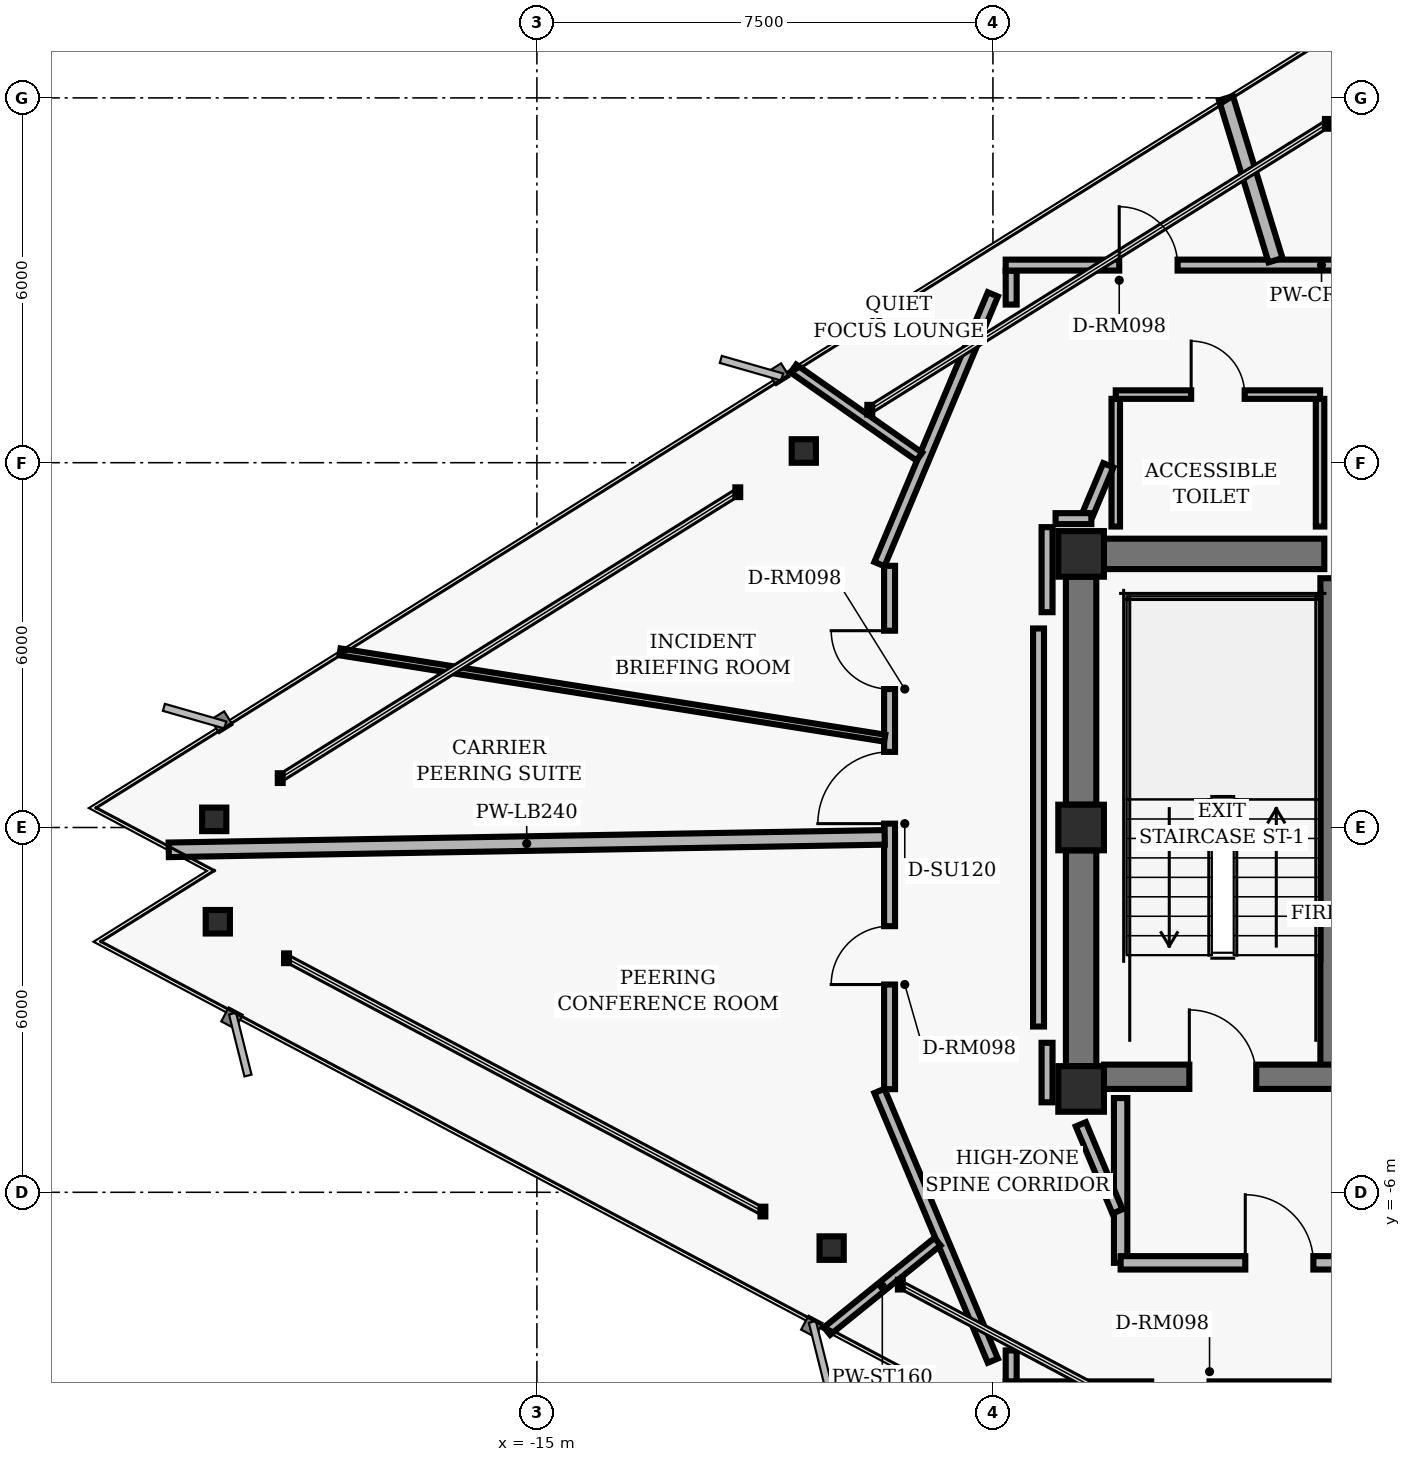
"""IFC4 building model, lengths in metres.
Left out: names, types, materials, properties, quantities, classifications, styles, units other than length and angle.
Written with IfcOpenShell. Run it as: python <this file> out.ifc"""

import sys

from ifc_helpers import new_model, si_unit, direction, frame, frame_2d, origin, origin_2d, place, context, subcontext, project, spatial, rectangle, hollow_rectangle, i_section, extrude, element, fill, save


model = new_model("IFC4")
c1 = context("Model", 3, precision=1e-05, world=origin(), true_north=direction((0.0, 1.0)))
c2 = subcontext(c1, "Body", "Model", "MODEL_VIEW")
j1 = project(units=[si_unit("LENGTHUNIT", "METRE"), si_unit("PLANEANGLEUNIT", "RADIAN")], contexts=[c1])
p1 = place(None, origin())
s1 = spatial("IfcSite", under=j1, at=p1, CompositionType="ELEMENT")
p2 = place(p1, origin())
s2 = spatial("IfcBuilding", under=s1, at=p2, CompositionType="ELEMENT")
p3 = place(p2, frame((0.0, 0.0, 196.64)))
s3 = spatial("IfcBuildingStorey", under=s2, at=p3, CompositionType="ELEMENT", Elevation=196.64)
for number, where, z_axis, x_axis in (
    (1, (-6.05, 4.5, 0.0), (0.0, 0.0, 1.0), (1.0, 0.0, 0.0)),
    (2, (-6.05, 0.0, 0.0), (0.0, 0.0, 1.0), (1.0, 0.0, 0.0)),
    (3, (-6.05, -4.3, 0.0), (0.0, 0.0, 1.0), (1.0, 0.0, 0.0)),
):
    element("IfcColumn", number, at=place(p3, frame(where, z_axis=z_axis, x_axis=x_axis)), inside=s3, PredefinedType="COLUMN", context=c2, shape_type="SweptSolid", body=[
        extrude(hollow_rectangle(XDim=0.75, YDim=0.75, WallThickness=0.05, InnerFilletRadius=0.02, OuterFilletRadius=0.04, at=origin_2d()), origin(), (0.0, 0.0, 1.0), 3.04),
    ])
p4 = place(p3, frame((-6.05, 0.375, 0.0), z_axis=(0.0, 0.0, 1.0), x_axis=(0.0, 1.0, 0.0)))
e4 = element("IfcWall", 4, at=p4, inside=s3, PredefinedType="SHEAR", context=c2, shape_type="SweptSolid", body=[
    extrude(rectangle(XDim=3.75, YDim=0.5, at=frame_2d((1.875, 0.0))), origin(), (0.0, 0.0, 1.0), 2.798),
])
p5 = place(p3, frame((-6.05, -3.925, 0.0), z_axis=(0.0, 0.0, 1.0), x_axis=(0.0, 1.0, 0.0)))
e5 = element("IfcWall", 5, at=p5, inside=s3, PredefinedType="SHEAR", context=c2, shape_type="SweptSolid", body=[
    extrude(rectangle(XDim=3.55, YDim=0.5, at=frame_2d((1.775, 0.0))), origin(), (0.0, 0.0, 1.0), 2.798),
])
p6 = place(p3, frame((-1.94, -4.1, 0.0), z_axis=(0.0, 0.0, 1.0), x_axis=(0.0, 1.0, 0.0)))
e6 = element("IfcWall", 6, at=p6, inside=s3, PredefinedType="SHEAR", context=c2, shape_type="SweptSolid", body=[
    extrude(rectangle(XDim=8.2, YDim=0.35, at=frame_2d((4.1, 0.0))), origin(), (0.0, 0.0, 1.0), 2.798),
])
p7 = place(p3, frame((-5.675, -4.1, 0.0), z_axis=(0.0, 0.0, 1.0), x_axis=(1.0, 0.0, 0.0)))
e7 = element("IfcWall", 7, at=p7, inside=s3, PredefinedType="SHEAR", context=c2, shape_type="SweptSolid", body=[
    extrude(rectangle(XDim=11.35, YDim=0.4, at=frame_2d((5.675, 0.0))), origin(), (0.0, 0.0, 1.0), 2.798),
])
p8 = place(p7, frame((1.405, 0.0, 0.0)))
e8 = element("IfcOpeningElement", 8, at=p8, cuts=e7, PredefinedType="OPENING", context=c2, shape_type="SweptSolid", body=[
    extrude(rectangle(XDim=1.1, YDim=2.04, at=frame_2d((0.55, 1.02))), frame((0.0, 0.21, 0.0), z_axis=(0.0, -1.0, 0.0), x_axis=(1.0, 0.0, 0.0)), (0.0, 0.0, 1.0), 0.42),
])
p9 = place(p7, frame((8.845, 0.0, 0.0)))
e9 = element("IfcOpeningElement", 9, at=p9, cuts=e7, PredefinedType="OPENING", context=c2, shape_type="SweptSolid", body=[
    extrude(rectangle(XDim=1.1, YDim=2.04, at=frame_2d((0.55, 1.02))), frame((0.0, 0.21, 0.0), z_axis=(0.0, -1.0, 0.0), x_axis=(1.0, 0.0, 0.0)), (0.0, 0.0, 1.0), 0.42),
])
p10 = place(p7, frame((4.145, 0.0, 0.0)))
e10 = element("IfcOpeningElement", 10, at=p10, cuts=e7, PredefinedType="OPENING", context=c2, shape_type="SweptSolid", body=[
    extrude(rectangle(XDim=1.06, YDim=2.04, at=frame_2d((0.53, 1.02))), frame((0.0, 0.21, 0.0), z_axis=(0.0, -1.0, 0.0), x_axis=(1.0, 0.0, 0.0)), (0.0, 0.0, 1.0), 0.42),
])
p11 = place(p7, frame((6.145, 0.0, 0.0)))
e11 = element("IfcOpeningElement", 11, at=p11, cuts=e7, PredefinedType="OPENING", context=c2, shape_type="SweptSolid", body=[
    extrude(rectangle(XDim=1.06, YDim=2.04, at=frame_2d((0.53, 1.02))), frame((0.0, 0.21, 0.0), z_axis=(0.0, -1.0, 0.0), x_axis=(1.0, 0.0, 0.0)), (0.0, 0.0, 1.0), 0.42),
])
p12 = place(p3, frame((-5.675, 4.5, 0.0), z_axis=(0.0, 0.0, 1.0), x_axis=(1.0, 0.0, 0.0)))
e12 = element("IfcWall", 12, at=p12, inside=s3, PredefinedType="SHEAR", context=c2, shape_type="SweptSolid", body=[
    extrude(rectangle(XDim=3.625, YDim=0.5, at=frame_2d((1.812, 0.0))), origin(), (0.0, 0.0, 1.0), 2.798),
])
for number, where, z_axis, x_axis in (
    (13, (-10.611, 6.193, 0.0), (0.0, 0.0, 1.0), (1.0, 0.0, 0.0)),
    (14, (-20.307, 0.134, 0.0), (0.0, 0.0, 1.0), (1.0, 0.0, 0.0)),
    (15, (-20.248, -1.55, 0.0), (0.0, 0.0, 1.0), (1.0, 0.0, 0.0)),
    (16, (-10.153, -6.918, 0.0), (0.0, 0.0, 1.0), (1.0, 0.0, 0.0)),
):
    element("IfcColumn", number, at=place(p3, frame(where, z_axis=z_axis, x_axis=x_axis)), inside=s3, PredefinedType="COLUMN", context=c2, shape_type="SweptSolid", body=[
        extrude(i_section(OverallWidth=0.398, OverallDepth=0.387, WebThickness=0.021, FlangeThickness=0.033, FilletRadius=0.018, at=origin_2d()), origin(), (0.0, 0.0, 1.0), 3.04),
    ])
p13 = place(p3, frame((-5.4, -7.16, 0.0), z_axis=(0.0, 0.0, 1.0), x_axis=(0.0, 1.0, 0.0)))
e17 = element("IfcWall", 17, at=p13, inside=s3, PredefinedType="PARTITIONING", context=c2, shape_type="SweptSolid", body=[
    extrude(rectangle(XDim=2.71, YDim=0.22, at=frame_2d((1.355, 0.0))), origin(), (0.0, 0.0, 1.0), 2.773),
])
p14 = place(p3, frame((-5.4, -7.16, 0.0), z_axis=(0.0, 0.0, 1.0), x_axis=(1.0, 0.0, 0.0)))
e18 = element("IfcWall", 18, at=p14, inside=s3, PredefinedType="PARTITIONING", context=c2, shape_type="SweptSolid", body=[
    extrude(rectangle(XDim=5.4, YDim=0.22, at=frame_2d((2.7, 0.0))), origin(), (0.0, 0.0, 1.0), 2.395),
])
p15 = place(p14, frame((2.05, 0.0, 0.0)))
e19 = element("IfcOpeningElement", 19, at=p15, cuts=e18, PredefinedType="OPENING", context=c2, shape_type="SweptSolid", body=[
    extrude(rectangle(XDim=1.12, YDim=2.02, at=frame_2d((0.56, 1.01))), frame((0.0, 0.12, 0.0), z_axis=(0.0, -1.0, 0.0), x_axis=(1.0, 0.0, 0.0)), (0.0, 0.0, 1.0), 0.24),
])
for number, where, z_axis, x_axis in (
    (20, (-5.48, 4.95, 0.0), (0.0, 0.0, 1.0), (0.0, 1.0, 0.0)),
    (21, (-2.12, 4.95, 0.0), (0.0, 0.0, 1.0), (0.0, 1.0, 0.0)),
):
    element("IfcWall", number, at=place(p3, frame(where, z_axis=z_axis, x_axis=x_axis)), inside=s3, PredefinedType="PARTITIONING", context=c2, shape_type="SweptSolid", body=[
        extrude(rectangle(XDim=2.1, YDim=0.14, at=frame_2d((1.05, 0.0))), origin(), (0.0, 0.0, 1.0), 2.773),
    ])
p16 = place(p3, frame((-5.48, 7.12, 0.0), z_axis=(0.0, 0.0, 1.0), x_axis=(1.0, 0.0, 0.0)))
e22 = element("IfcWall", 22, at=p16, inside=s3, PredefinedType="PARTITIONING", context=c2, shape_type="SweptSolid", body=[
    extrude(rectangle(XDim=3.36, YDim=0.14, at=frame_2d((1.68, 0.0))), origin(), (0.0, 0.0, 1.0), 2.773),
])
p17 = place(p16, frame((1.24, 0.0, 0.0)))
e23 = element("IfcOpeningElement", 23, at=p17, cuts=e22, PredefinedType="OPENING", context=c2, shape_type="SweptSolid", body=[
    extrude(rectangle(XDim=0.88, YDim=2.02, at=frame_2d((0.44, 1.01))), frame((0.0, 0.08, 0.0), z_axis=(0.0, -1.0, 0.0), x_axis=(1.0, 0.0, 0.0)), (0.0, 0.0, 1.0), 0.16),
])
p18 = place(p3, frame((-7.501, -8.769, 0.0), z_axis=(0.0, 0.0, 1.0), x_axis=(-0.387573945081, 0.921838617706, 0.0)))
e24 = element("IfcWall", 24, at=p18, inside=s3, PredefinedType="PARTITIONING", context=c2, shape_type="SweptSolid", body=[
    extrude(rectangle(XDim=4.813, YDim=0.18, at=frame_2d((2.407, 0.0))), origin(), (0.0, 0.0, 1.0), 2.773),
])
p19 = place(p3, frame((-9.2, -4.303, 0.0), z_axis=(0.0, 0.0, 1.0), x_axis=(0.0, 1.0, 0.0)))
e25 = element("IfcWall", 25, at=p19, inside=s3, PredefinedType="PARTITIONING", context=c2, shape_type="SweptSolid", body=[
    extrude(rectangle(XDim=8.607, YDim=0.18, at=frame_2d((4.303, 0.0))), origin(), (0.0, 0.0, 1.0), 2.773),
])
p20 = place(p19, frame((1.721, 0.0, 0.0)))
e26 = element("IfcOpeningElement", 26, at=p20, cuts=e25, PredefinedType="OPENING", context=c2, shape_type="SweptSolid", body=[
    extrude(rectangle(XDim=0.96, YDim=2.02, at=frame_2d((0.48, 1.01))), frame((0.0, 0.1, 0.0), z_axis=(0.0, -1.0, 0.0), x_axis=(1.0, 0.0, 0.0)), (0.0, 0.0, 1.0), 0.2),
])
p21 = place(p19, frame((6.58, 0.0, 0.0)))
e27 = element("IfcOpeningElement", 27, at=p21, cuts=e25, PredefinedType="OPENING", context=c2, shape_type="SweptSolid", body=[
    extrude(rectangle(XDim=0.96, YDim=2.02, at=frame_2d((0.48, 1.01))), frame((0.0, 0.1, 0.0), z_axis=(0.0, -1.0, 0.0), x_axis=(1.0, 0.0, 0.0)), (0.0, 0.0, 1.0), 0.2),
])
p22 = place(p19, frame((4.367, 0.0, 0.0)))
e28 = element("IfcOpeningElement", 28, at=p22, cuts=e25, PredefinedType="OPENING", context=c2, shape_type="SweptSolid", body=[
    extrude(rectangle(XDim=1.18, YDim=2.02, at=frame_2d((0.59, 1.01))), frame((0.0, 0.1, 0.0), z_axis=(0.0, -1.0, 0.0), x_axis=(1.0, 0.0, 0.0)), (0.0, 0.0, 1.0), 0.2),
])
p23 = place(p3, frame((-9.367, 4.332, 0.0), z_axis=(0.0, 0.0, 1.0), x_axis=(0.387573945081, 0.921838617706, 0.0)))
e29 = element("IfcWall", 29, at=p23, inside=s3, PredefinedType="PARTITIONING", context=c2, shape_type="SweptSolid", body=[
    extrude(rectangle(XDim=4.813, YDim=0.18, at=frame_2d((2.407, 0.0))), origin(), (0.0, 0.0, 1.0), 2.773),
])
p24 = place(p3, frame((-7.2, 8.601, 0.0), z_axis=(0.0, 0.0, 1.0), x_axis=(0.0, 1.0, 0.0)))
e30 = element("IfcWall", 30, at=p24, inside=s3, PredefinedType="PARTITIONING", context=c2, shape_type="SweptSolid", body=[
    extrude(rectangle(XDim=0.559, YDim=0.18, at=frame_2d((0.28, 0.0))), origin(), (0.0, 0.0, 1.0), 2.773),
])
p25 = place(p3, frame((-7.29, 9.25, 0.0), z_axis=(0.0, 0.0, 1.0), x_axis=(1.0, 0.0, 0.0)))
e31 = element("IfcWall", 31, at=p25, inside=s3, PredefinedType="PARTITIONING", context=c2, shape_type="SweptSolid", body=[
    extrude(rectangle(XDim=13.3, YDim=0.18, at=frame_2d((6.65, 0.0))), origin(), (0.0, 0.0, 1.0), 2.773),
])
p26 = place(p25, frame((11.864, 0.0, 0.0)))
e32 = element("IfcOpeningElement", 32, at=p26, cuts=e31, PredefinedType="OPENING", context=c2, shape_type="SweptSolid", body=[
    extrude(rectangle(XDim=0.96, YDim=2.02, at=frame_2d((0.48, 1.01))), frame((0.0, 0.1, 0.0), z_axis=(0.0, -1.0, 0.0), x_axis=(1.0, 0.0, 0.0)), (0.0, 0.0, 1.0), 0.2),
])
p27 = place(p25, frame((7.561, 0.0, 0.0)))
e33 = element("IfcOpeningElement", 33, at=p27, cuts=e31, PredefinedType="OPENING", context=c2, shape_type="SweptSolid", body=[
    extrude(rectangle(XDim=0.96, YDim=2.02, at=frame_2d((0.48, 1.01))), frame((0.0, 0.1, 0.0), z_axis=(0.0, -1.0, 0.0), x_axis=(1.0, 0.0, 0.0)), (0.0, 0.0, 1.0), 0.2),
])
p28 = place(p25, frame((1.867, 0.0, 0.0)))
e34 = element("IfcOpeningElement", 34, at=p28, cuts=e31, PredefinedType="OPENING", context=c2, shape_type="SweptSolid", body=[
    extrude(rectangle(XDim=0.96, YDim=2.02, at=frame_2d((0.48, 1.01))), frame((0.0, 0.1, 0.0), z_axis=(0.0, -1.0, 0.0), x_axis=(1.0, 0.0, 0.0)), (0.0, 0.0, 1.0), 0.2),
])
p29 = place(p3, frame((-5.602, 5.958, 0.0), z_axis=(0.0, 0.0, 1.0), x_axis=(-0.387588639363, -0.921832439566, 0.0)))
e35 = element("IfcWall", 35, at=p29, inside=s3, PredefinedType="PARTITIONING", context=c2, shape_type="SweptSolid", body=[
    extrude(rectangle(XDim=0.862, YDim=0.18, at=frame_2d((0.431, 0.0))), origin(), (0.0, 0.0, 1.0), 2.773),
])
p30 = place(p3, frame((-5.881, 5.08, 0.0), z_axis=(0.0, 0.0, 1.0), x_axis=(-1.0, 0.0, 0.0)))
e36 = element("IfcWall", 36, at=p30, inside=s3, PredefinedType="PARTITIONING", context=c2, shape_type="SweptSolid", body=[
    extrude(rectangle(XDim=0.589, YDim=0.18, at=frame_2d((0.294, 0.0))), origin(), (0.0, 0.0, 1.0), 2.773),
])
p31 = place(p3, frame((-6.61, 4.94, 0.0), z_axis=(0.0, 0.0, 1.0), x_axis=(0.0, -1.0, 0.0)))
e37 = element("IfcWall", 37, at=p31, inside=s3, PredefinedType="PARTITIONING", context=c2, shape_type="SweptSolid", body=[
    extrude(rectangle(XDim=1.399, YDim=0.18, at=frame_2d((0.699, 0.0))), origin(), (0.0, 0.0, 1.0), 2.773),
])
p32 = place(p3, frame((-6.75, 3.273, 0.0), z_axis=(0.0, 0.0, 1.0), x_axis=(0.0, -1.0, 0.0)))
e38 = element("IfcWall", 38, at=p32, inside=s3, PredefinedType="PARTITIONING", context=c2, shape_type="SweptSolid", body=[
    extrude(rectangle(XDim=6.547, YDim=0.18, at=frame_2d((3.273, 0.0))), origin(), (0.0, 0.0, 1.0), 2.773),
])
p33 = place(p3, frame((-6.61, -3.541, 0.0), z_axis=(0.0, 0.0, 1.0), x_axis=(0.0, -1.0, 0.0)))
e39 = element("IfcWall", 39, at=p33, inside=s3, PredefinedType="PARTITIONING", context=c2, shape_type="SweptSolid", body=[
    extrude(rectangle(XDim=0.979, YDim=0.18, at=frame_2d((0.489, 0.0))), origin(), (0.0, 0.0, 1.0), 2.773),
])
p34 = place(p3, frame((-6.055, -4.882, 0.0), z_axis=(0.0, 0.0, 1.0), x_axis=(0.387579540458, -0.921836265189, 0.0)))
e40 = element("IfcWall", 40, at=p34, inside=s3, PredefinedType="PARTITIONING", context=c2, shape_type="SweptSolid", body=[
    extrude(rectangle(XDim=1.555, YDim=0.18, at=frame_2d((0.777, 0.0))), origin(), (0.0, 0.0, 1.0), 2.253),
])
p35 = place(p3, frame((6.01, -9.2, 0.0), z_axis=(0.0, 0.0, 1.0), x_axis=(-1.0, 0.0, 0.0)))
e41 = element("IfcWall", 41, at=p35, inside=s3, PredefinedType="PARTITIONING", context=c2, shape_type="SweptSolid", body=[
    extrude(rectangle(XDim=13.3, YDim=0.18, at=frame_2d((6.65, 0.0))), origin(), (0.0, 0.0, 1.0), 2.395),
])
p36 = place(p35, frame((9.948, 0.0, 0.0)))
e42 = element("IfcOpeningElement", 42, at=p36, cuts=e41, PredefinedType="OPENING", context=c2, shape_type="SweptSolid", body=[
    extrude(rectangle(XDim=0.96, YDim=2.02, at=frame_2d((0.48, 1.01))), frame((0.0, 0.1, 0.0), z_axis=(0.0, -1.0, 0.0), x_axis=(1.0, 0.0, 0.0)), (0.0, 0.0, 1.0), 0.2),
])
p37 = place(p35, frame((3.857, 0.0, 0.0)))
e43 = element("IfcOpeningElement", 43, at=p37, cuts=e41, PredefinedType="OPENING", context=c2, shape_type="SweptSolid", body=[
    extrude(rectangle(XDim=0.96, YDim=2.02, at=frame_2d((0.48, 1.01))), frame((0.0, 0.1, 0.0), z_axis=(0.0, -1.0, 0.0), x_axis=(1.0, 0.0, 0.0)), (0.0, 0.0, 1.0), 0.2),
])
p38 = place(p3, frame((-7.2, -9.11, 0.0), z_axis=(0.0, 0.0, 1.0), x_axis=(0.0, 1.0, 0.0)))
e44 = element("IfcWall", 44, at=p38, inside=s3, PredefinedType="PARTITIONING", context=c2, shape_type="SweptSolid", body=[
    extrude(rectangle(XDim=0.51, YDim=0.18, at=frame_2d((0.255, 0.0))), origin(), (0.0, 0.0, 1.0), 2.773),
])
p39 = place(p3, frame((-9.28, -0.162, 0.0), z_axis=(0.0, 0.0, 1.0), x_axis=(-0.999847998997, -0.017434990714, 0.0)))
e45 = element("IfcWall", 45, at=p39, inside=s3, PredefinedType="PARTITIONING", context=c2, shape_type="SweptSolid", body=[
    extrude(rectangle(XDim=11.776, YDim=0.24, at=frame_2d((5.888, 0.0))), origin(), (0.0, 0.0, 1.0), 2.253),
])
p40 = place(p3, frame((-8.411, -6.811, 0.0), z_axis=(0.0, 0.0, 1.0), x_axis=(-0.777176762159, -0.629282353448, 0.0)))
e46 = element("IfcWall", 46, at=p40, inside=s3, PredefinedType="PARTITIONING", context=c2, shape_type="SweptSolid", body=[
    extrude(rectangle(XDim=2.337, YDim=0.16, at=frame_2d((1.169, 0.0))), origin(), (0.0, 0.0, 1.0), 2.773),
])
p41 = place(p3, frame((-2.853, 9.33, 0.0), z_axis=(0.0, 0.0, 1.0), x_axis=(-0.292329881005, 0.956317541757, 0.0)))
e47 = element("IfcWall", 47, at=p41, inside=s3, PredefinedType="PARTITIONING", context=c2, shape_type="SweptSolid", body=[
    extrude(rectangle(XDim=2.785, YDim=0.24, at=frame_2d((1.393, 0.0))), origin(), (0.0, 0.0, 1.0), 2.773),
])
p42 = place(p3, frame((-8.71, 6.099, 0.0), z_axis=(0.0, 0.0, 1.0), x_axis=(-0.819154754917, 0.573572565154, 0.0)))
e48 = element("IfcWall", 48, at=p42, inside=s3, PredefinedType="PARTITIONING", context=c2, shape_type="SweptSolid", body=[
    extrude(rectangle(XDim=2.527, YDim=0.16, at=frame_2d((1.264, 0.0))), origin(), (0.0, 0.0, 1.0), 2.773),
])
p43 = place(p3, frame((-9.28, 1.47, 0.0), z_axis=(0.0, 0.0, 1.0), x_axis=(-0.987686019225, 0.156449120891, 0.0)))
e49 = element("IfcWall", 49, at=p43, inside=s3, PredefinedType="MOVABLE", context=c2, shape_type="SweptSolid", body=[
    extrude(rectangle(XDim=9.07, YDim=0.115, at=frame_2d((4.535, 0.0))), origin(), (0.0, 0.0, 1.0), 2.773),
])
p44 = place(p8, origin())
e50 = element("IfcDoor", 50, at=p44, inside=s3, OperationType="SINGLE_SWING_LEFT", PredefinedType="DOOR", context=c2, shape_type="SweptSolid", body=[
    extrude(rectangle(XDim=1.1, YDim=2.04, at=frame_2d((0.55, 1.02))), frame((0.0, 0.025, 0.0), z_axis=(0.0, -1.0, 0.0), x_axis=(1.0, 0.0, 0.0)), (0.0, 0.0, 1.0), 0.05),
])
fill(e8, e50)
p45 = place(p15, origin())
e51 = element("IfcDoor", 51, at=p45, inside=s3, OperationType="SINGLE_SWING_LEFT", PredefinedType="DOOR", context=c2, shape_type="SweptSolid", body=[
    extrude(rectangle(XDim=1.12, YDim=2.02, at=frame_2d((0.56, 1.01))), frame((0.0, 0.025, 0.0), z_axis=(0.0, -1.0, 0.0), x_axis=(1.0, 0.0, 0.0)), (0.0, 0.0, 1.0), 0.05),
])
fill(e19, e51)
p46 = place(p17, origin())
e52 = element("IfcDoor", 52, at=p46, inside=s3, OperationType="SINGLE_SWING_LEFT", PredefinedType="DOOR", context=c2, shape_type="SweptSolid", body=[
    extrude(rectangle(XDim=0.88, YDim=2.02, at=frame_2d((0.44, 1.01))), frame((0.0, 0.025, 0.0), z_axis=(0.0, -1.0, 0.0), x_axis=(1.0, 0.0, 0.0)), (0.0, 0.0, 1.0), 0.05),
])
fill(e23, e52)
p47 = place(p20, origin())
e53 = element("IfcDoor", 53, at=p47, inside=s3, OperationType="SINGLE_SWING_LEFT", PredefinedType="DOOR", context=c2, shape_type="SweptSolid", body=[
    extrude(rectangle(XDim=0.96, YDim=2.02, at=frame_2d((0.48, 1.01))), frame((0.0, 0.025, 0.0), z_axis=(0.0, -1.0, 0.0), x_axis=(1.0, 0.0, 0.0)), (0.0, 0.0, 1.0), 0.05),
])
fill(e26, e53)
p48 = place(p28, origin())
e54 = element("IfcDoor", 54, at=p48, inside=s3, OperationType="SINGLE_SWING_LEFT", PredefinedType="DOOR", context=c2, shape_type="SweptSolid", body=[
    extrude(rectangle(XDim=0.96, YDim=2.02, at=frame_2d((0.48, 1.01))), frame((0.0, 0.025, 0.0), z_axis=(0.0, -1.0, 0.0), x_axis=(1.0, 0.0, 0.0)), (0.0, 0.0, 1.0), 0.05),
])
fill(e34, e54)
p49 = place(p21, origin())
e55 = element("IfcDoor", 55, at=p49, inside=s3, OperationType="SINGLE_SWING_RIGHT", PredefinedType="DOOR", context=c2, shape_type="SweptSolid", body=[
    extrude(rectangle(XDim=0.96, YDim=2.02, at=frame_2d((0.48, 1.01))), frame((0.0, 0.025, 0.0), z_axis=(0.0, -1.0, 0.0), x_axis=(1.0, 0.0, 0.0)), (0.0, 0.0, 1.0), 0.05),
])
fill(e27, e55)
p50 = place(p22, origin())
e56 = element("IfcDoor", 56, at=p50, inside=s3, OperationType="SINGLE_SWING_LEFT", PredefinedType="DOOR", context=c2, shape_type="SweptSolid", body=[
    extrude(rectangle(XDim=1.18, YDim=2.02, at=frame_2d((0.59, 1.01))), frame((0.0, 0.025, 0.0), z_axis=(0.0, -1.0, 0.0), x_axis=(1.0, 0.0, 0.0)), (0.0, 0.0, 1.0), 0.05),
])
fill(e28, e56)
save(model, sys.argv[1])
